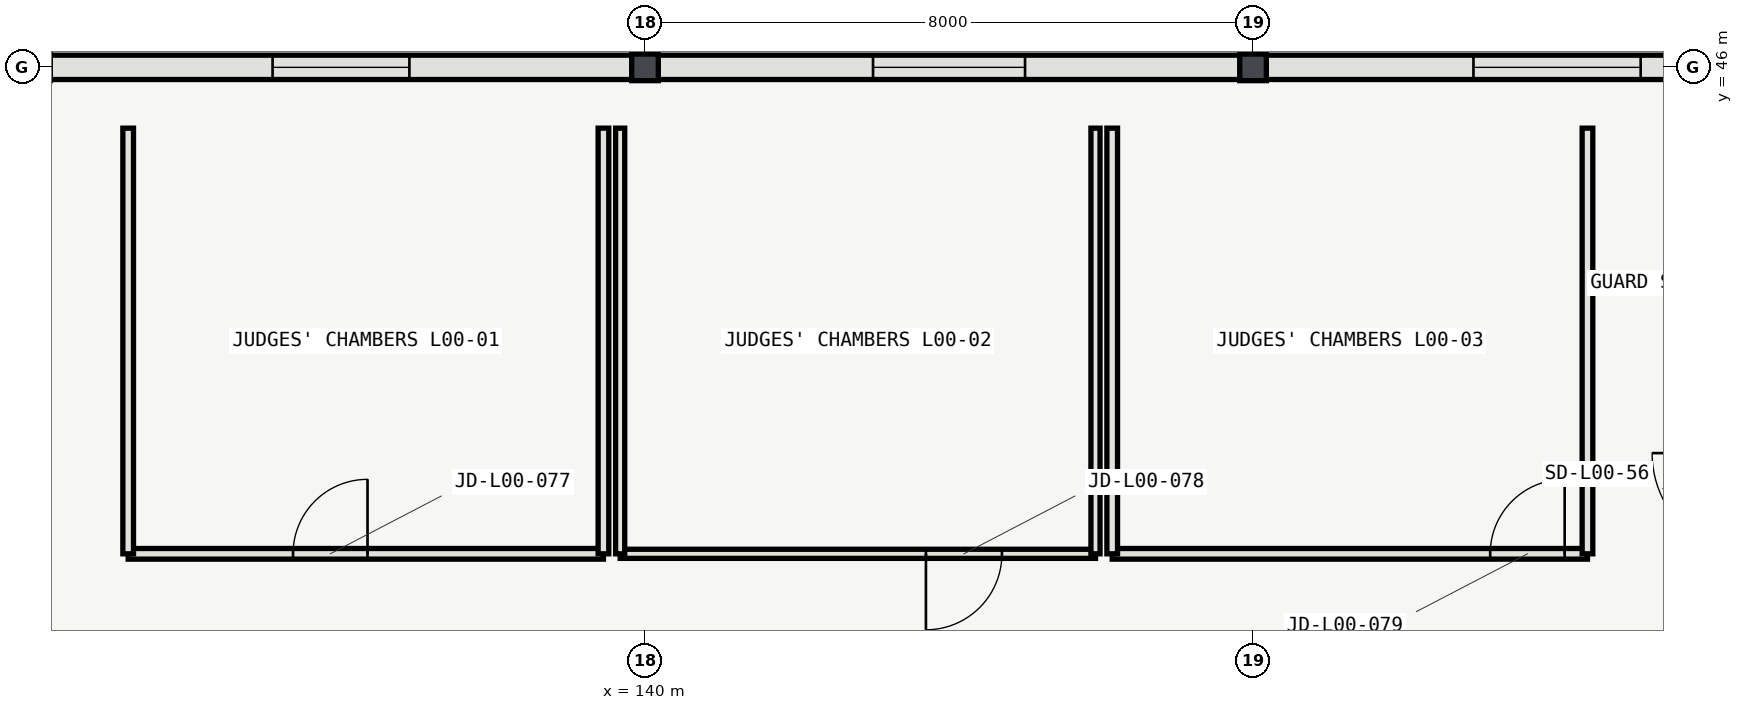
"""IFC4 building model, lengths in metres.
Left out: names, types, materials, properties, quantities, classifications, styles, units other than length and angle.
Written with IfcOpenShell. Run it as: python <this file> out.ifc"""

import sys

from ifc_helpers import new_model, si_unit, direction, frame, frame_2d, origin, origin_2d, place, context, subcontext, project, spatial, rectangle, i_section, extrude, element, fill, save


model = new_model("IFC4")
c1 = context("Model", 3, precision=1e-05, world=origin(), true_north=direction((0.0, 1.0)))
c2 = subcontext(c1, "Body", "Model", "MODEL_VIEW")
j1 = project(units=[si_unit("LENGTHUNIT", "METRE"), si_unit("PLANEANGLEUNIT", "RADIAN")], contexts=[c1])
p1 = place(None, origin())
s1 = spatial("IfcSite", under=j1, at=p1, CompositionType="ELEMENT")
p2 = place(p1, origin())
s2 = spatial("IfcBuilding", under=s1, at=p2, CompositionType="ELEMENT")
p3 = place(p2, origin())
s3 = spatial("IfcBuildingStorey", under=s2, at=p3, CompositionType="ELEMENT", Elevation=0.0)
for number, where, z_axis, x_axis in (
    (1, (140.0, 46.0, 0.0), (0.0, 0.0, 1.0), (1.0, 0.0, 0.0)),
    (2, (148.0, 46.0, 0.0), (0.0, 0.0, 1.0), (1.0, 0.0, 0.0)),
):
    element("IfcColumn", number, at=place(p3, frame(where, z_axis=z_axis, x_axis=x_axis)), inside=s3, PredefinedType="COLUMN", context=c2, shape_type="SweptSolid", body=[
        extrude(i_section(OverallWidth=0.35, OverallDepth=0.35, WebThickness=0.012, FlangeThickness=0.019, FilletRadius=0.02, at=origin_2d()), origin(), (0.0, 0.0, 1.0), 5.4),
    ])
p4 = place(p3, frame((139.829, 46.0, 0.0), z_axis=(0.0, 0.0, 1.0), x_axis=(-1.0, 0.0, 0.0)))
e3 = element("IfcWall", 3, at=p4, inside=s3, PredefinedType="SOLIDWALL", context=c2, shape_type="SweptSolid", body=[
    extrude(rectangle(XDim=7.658, YDim=0.32, at=frame_2d((3.829, 0.0))), origin(), (0.0, 0.0, 1.0), 4.663),
])
p5 = place(p4, frame((2.929, 0.0, 0.95)))
e4 = element("IfcOpeningElement", 4, at=p5, cuts=e3, PredefinedType="OPENING", context=c2, shape_type="SweptSolid", body=[
    extrude(rectangle(XDim=1.8, YDim=2.1, at=frame_2d((0.9, 1.05))), frame((0.0, 0.17, 0.0), z_axis=(0.0, -1.0, 0.0), x_axis=(1.0, 0.0, 0.0)), (0.0, 0.0, 1.0), 0.34),
])
p6 = place(p3, frame((147.829, 46.0, 0.0), z_axis=(0.0, 0.0, 1.0), x_axis=(-1.0, 0.0, 0.0)))
e5 = element("IfcWall", 5, at=p6, inside=s3, PredefinedType="SOLIDWALL", context=c2, shape_type="SweptSolid", body=[
    extrude(rectangle(XDim=7.658, YDim=0.32, at=frame_2d((3.829, 0.0))), origin(), (0.0, 0.0, 1.0), 4.663),
])
p7 = place(p6, frame((2.829, 0.0, 0.95)))
e6 = element("IfcOpeningElement", 6, at=p7, cuts=e5, PredefinedType="OPENING", context=c2, shape_type="SweptSolid", body=[
    extrude(rectangle(XDim=2.0, YDim=2.1, at=frame_2d((1.0, 1.05))), frame((0.0, 0.17, 0.0), z_axis=(0.0, -1.0, 0.0), x_axis=(1.0, 0.0, 0.0)), (0.0, 0.0, 1.0), 0.34),
])
p8 = place(p3, frame((155.829, 46.0, 0.0), z_axis=(0.0, 0.0, 1.0), x_axis=(-1.0, 0.0, 0.0)))
e7 = element("IfcWall", 7, at=p8, inside=s3, PredefinedType="SOLIDWALL", context=c2, shape_type="SweptSolid", body=[
    extrude(rectangle(XDim=7.658, YDim=0.32, at=frame_2d((3.829, 0.0))), origin(), (0.0, 0.0, 1.0), 4.663),
])
p9 = place(p8, frame((2.729, 0.0, 0.95)))
e8 = element("IfcOpeningElement", 8, at=p9, cuts=e7, PredefinedType="OPENING", context=c2, shape_type="SweptSolid", body=[
    extrude(rectangle(XDim=2.2, YDim=2.1, at=frame_2d((1.1, 1.05))), frame((0.0, 0.17, 0.0), z_axis=(0.0, -1.0, 0.0), x_axis=(1.0, 0.0, 0.0)), (0.0, 0.0, 1.0), 0.34),
])
p10 = place(p3, frame((133.2, 39.6, 0.0), z_axis=(0.0, 0.0, 1.0), x_axis=(1.0, 0.0, 0.0)))
e9 = element("IfcWall", 9, at=p10, inside=s3, PredefinedType="PARTITIONING", context=c2, shape_type="SweptSolid", body=[
    extrude(rectangle(XDim=6.253, YDim=0.14, at=frame_2d((3.126, 0.0))), origin(), (0.0, 0.0, 1.0), 5.12),
])
p11 = place(p10, frame((2.169, 0.0, 0.0)))
e10 = element("IfcOpeningElement", 10, at=p11, cuts=e9, PredefinedType="OPENING", context=c2, shape_type="SweptSolid", body=[
    extrude(rectangle(XDim=0.98, YDim=2.2, at=frame_2d((0.49, 1.1))), frame((0.0, 0.08, 0.0), z_axis=(0.0, -1.0, 0.0), x_axis=(1.0, 0.0, 0.0)), (0.0, 0.0, 1.0), 0.16),
])
for number, where, z_axis, x_axis in (
    (11, (133.2, 45.2, 0.0), (0.0, 0.0, 1.0), (0.0, -1.0, 0.0)),
    (12, (139.453, 39.6, 0.0), (0.0, 0.0, 1.0), (0.0, 1.0, 0.0)),
):
    element("IfcWall", number, at=place(p3, frame(where, z_axis=z_axis, x_axis=x_axis)), inside=s3, PredefinedType="PARTITIONING", context=c2, shape_type="SweptSolid", body=[
        extrude(rectangle(XDim=5.6, YDim=0.14, at=frame_2d((2.8, 0.0))), origin(), (0.0, 0.0, 1.0), 5.12),
    ])
p12 = place(p3, frame((139.673, 39.6, 0.0), z_axis=(0.0, 0.0, 1.0), x_axis=(1.0, 0.0, 0.0)))
e13 = element("IfcWall", 13, at=p12, inside=s3, PredefinedType="PARTITIONING", context=c2, shape_type="SweptSolid", body=[
    extrude(rectangle(XDim=6.254, YDim=0.12, at=frame_2d((3.127, 0.0))), origin(), (0.0, 0.0, 1.0), 5.12),
])
p13 = place(p12, frame((4.023, 0.0, 0.0)))
e14 = element("IfcOpeningElement", 14, at=p13, cuts=e13, PredefinedType="OPENING", context=c2, shape_type="SweptSolid", body=[
    extrude(rectangle(XDim=1.0, YDim=2.15, at=frame_2d((0.5, 1.075))), frame((0.0, 0.07, 0.0), z_axis=(0.0, -1.0, 0.0), x_axis=(1.0, 0.0, 0.0)), (0.0, 0.0, 1.0), 0.14),
])
p14 = place(p3, frame((139.673, 45.2, 0.0), z_axis=(0.0, 0.0, 1.0), x_axis=(0.0, -1.0, 0.0)))
e15 = element("IfcWall", 15, at=p14, inside=s3, PredefinedType="PARTITIONING", context=c2, shape_type="SweptSolid", body=[
    extrude(rectangle(XDim=5.6, YDim=0.12, at=frame_2d((2.8, 0.0))), origin(), (0.0, 0.0, 1.0), 4.506),
])
p15 = place(p3, frame((145.927, 39.6, 0.0), z_axis=(0.0, 0.0, 1.0), x_axis=(0.0, 1.0, 0.0)))
e16 = element("IfcWall", 16, at=p15, inside=s3, PredefinedType="PARTITIONING", context=c2, shape_type="SweptSolid", body=[
    extrude(rectangle(XDim=5.6, YDim=0.12, at=frame_2d((2.8, 0.0))), origin(), (0.0, 0.0, 1.0), 5.12),
])
p16 = place(p3, frame((146.147, 39.6, 0.0), z_axis=(0.0, 0.0, 1.0), x_axis=(1.0, 0.0, 0.0)))
e17 = element("IfcWall", 17, at=p16, inside=s3, PredefinedType="PARTITIONING", context=c2, shape_type="SweptSolid", body=[
    extrude(rectangle(XDim=6.253, YDim=0.14, at=frame_2d((3.126, 0.0))), origin(), (0.0, 0.0, 1.0), 5.12),
])
p17 = place(p16, frame((4.973, 0.0, 0.0)))
e18 = element("IfcOpeningElement", 18, at=p17, cuts=e17, PredefinedType="OPENING", context=c2, shape_type="SweptSolid", body=[
    extrude(rectangle(XDim=0.98, YDim=2.15, at=frame_2d((0.49, 1.075))), frame((0.0, 0.08, 0.0), z_axis=(0.0, -1.0, 0.0), x_axis=(1.0, 0.0, 0.0)), (0.0, 0.0, 1.0), 0.16),
])
for number, where, z_axis, x_axis in (
    (19, (146.147, 45.2, 0.0), (0.0, 0.0, 1.0), (0.0, -1.0, 0.0)),
    (20, (152.4, 39.6, 0.0), (0.0, 0.0, 1.0), (0.0, 1.0, 0.0)),
):
    element("IfcWall", number, at=place(p3, frame(where, z_axis=z_axis, x_axis=x_axis)), inside=s3, PredefinedType="PARTITIONING", context=c2, shape_type="SweptSolid", body=[
        extrude(rectangle(XDim=5.6, YDim=0.14, at=frame_2d((2.8, 0.0))), origin(), (0.0, 0.0, 1.0), 5.12),
    ])
p18 = place(p5, origin())
e21 = element("IfcWindow", 21, at=p18, inside=s3, PartitioningType="SINGLE_PANEL", PredefinedType="WINDOW", context=c2, shape_type="SweptSolid", body=[
    extrude(rectangle(XDim=1.8, YDim=2.1, at=frame_2d((0.9, 1.05))), frame((0.0, 0.03, 0.0), z_axis=(0.0, -1.0, 0.0), x_axis=(1.0, 0.0, 0.0)), (0.0, 0.0, 1.0), 0.06),
])
fill(e4, e21)
p19 = place(p7, origin())
e22 = element("IfcWindow", 22, at=p19, inside=s3, PartitioningType="SINGLE_PANEL", PredefinedType="WINDOW", context=c2, shape_type="SweptSolid", body=[
    extrude(rectangle(XDim=2.0, YDim=2.1, at=frame_2d((1.0, 1.05))), frame((0.0, 0.03, 0.0), z_axis=(0.0, -1.0, 0.0), x_axis=(1.0, 0.0, 0.0)), (0.0, 0.0, 1.0), 0.06),
])
fill(e6, e22)
p20 = place(p9, origin())
e23 = element("IfcWindow", 23, at=p20, inside=s3, PartitioningType="SINGLE_PANEL", PredefinedType="WINDOW", context=c2, shape_type="SweptSolid", body=[
    extrude(rectangle(XDim=2.2, YDim=2.1, at=frame_2d((1.1, 1.05))), frame((0.0, 0.03, 0.0), z_axis=(0.0, -1.0, 0.0), x_axis=(1.0, 0.0, 0.0)), (0.0, 0.0, 1.0), 0.06),
])
fill(e8, e23)
p21 = place(p11, origin())
e24 = element("IfcDoor", 24, at=p21, inside=s3, OperationType="SINGLE_SWING_RIGHT", PredefinedType="DOOR", context=c2, shape_type="SweptSolid", body=[
    extrude(rectangle(XDim=0.98, YDim=2.2, at=frame_2d((0.49, 1.1))), frame((0.0, 0.025, 0.0), z_axis=(0.0, -1.0, 0.0), x_axis=(1.0, 0.0, 0.0)), (0.0, 0.0, 1.0), 0.05),
])
fill(e10, e24)
p22 = place(p13, origin())
e25 = element("IfcDoor", 25, at=p22, inside=s3, OperationType="SINGLE_SWING_LEFT", PredefinedType="DOOR", context=c2, shape_type="SweptSolid", body=[
    extrude(rectangle(XDim=1.0, YDim=2.15, at=frame_2d((0.5, 1.075))), frame((0.0, 0.025, 0.0), z_axis=(0.0, -1.0, 0.0), x_axis=(1.0, 0.0, 0.0)), (0.0, 0.0, 1.0), 0.05),
])
fill(e14, e25)
p23 = place(p17, origin())
e26 = element("IfcDoor", 26, at=p23, inside=s3, OperationType="SINGLE_SWING_RIGHT", PredefinedType="DOOR", context=c2, shape_type="SweptSolid", body=[
    extrude(rectangle(XDim=0.98, YDim=2.15, at=frame_2d((0.49, 1.075))), frame((0.0, 0.025, 0.0), z_axis=(0.0, -1.0, 0.0), x_axis=(1.0, 0.0, 0.0)), (0.0, 0.0, 1.0), 0.05),
])
fill(e18, e26)
save(model, sys.argv[1])
